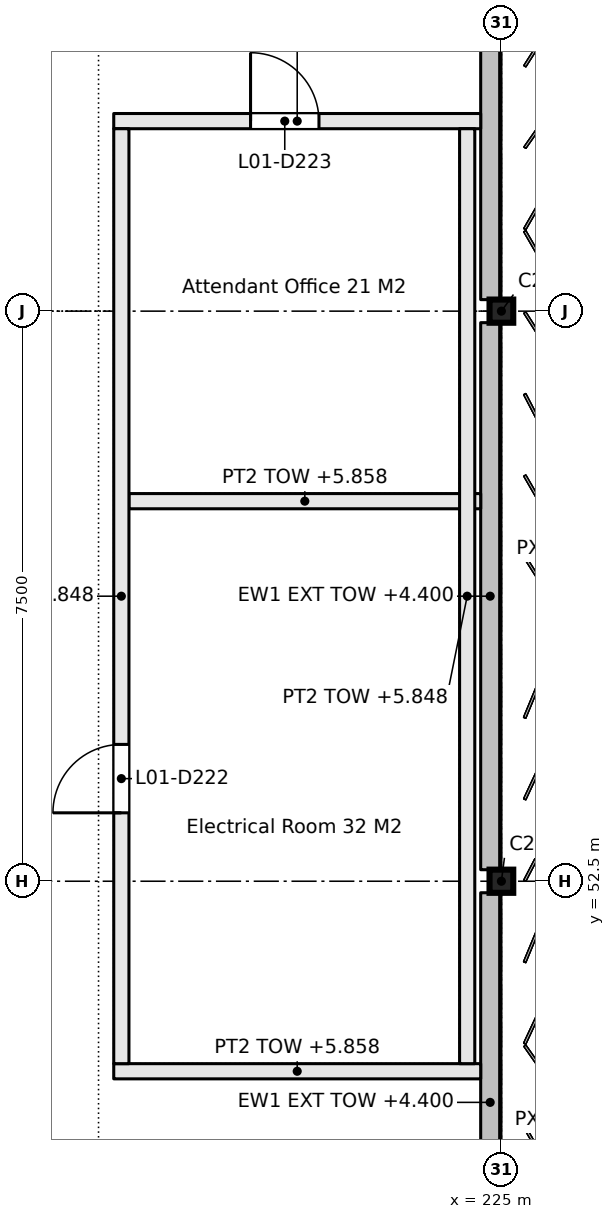
"""IFC4 building model, lengths in metres.
Left out: names, types, materials, properties, quantities, classifications, styles, units other than length and angle.
Written with IfcOpenShell. Run it as: python <this file> out.ifc"""

import sys

from ifc_helpers import new_model, si_unit, direction, frame, frame_2d, origin, origin_2d, place, context, subcontext, project, spatial, rectangle, i_section, extrude, element, fill, save


model = new_model("IFC4")
c1 = context("Model", 3, precision=1e-05, world=origin(), true_north=direction((0.0, 1.0)))
c2 = subcontext(c1, "Body", "Model", "MODEL_VIEW")
j1 = project(units=[si_unit("LENGTHUNIT", "METRE"), si_unit("PLANEANGLEUNIT", "RADIAN")], contexts=[c1])
p1 = place(None, origin())
s1 = spatial("IfcSite", under=j1, at=p1, CompositionType="ELEMENT")
p2 = place(p1, origin())
s2 = spatial("IfcBuilding", under=s1, at=p2, CompositionType="ELEMENT")
p3 = place(p2, frame((0.0, 0.0, 3.3)))
s3 = spatial("IfcBuildingStorey", under=s2, at=p3, CompositionType="ELEMENT", Elevation=3.3)
for number, where, z_axis, x_axis in (
    (1, (225.0, 60.0, 0.0), (0.0, 0.0, 1.0), (0.0, 1.0, 0.0)),
    (2, (225.0, 52.5, 0.0), (0.0, 0.0, 1.0), (0.0, 1.0, 0.0)),
):
    element("IfcColumn", number, at=place(p3, frame(where, z_axis=z_axis, x_axis=x_axis)), inside=s3, PredefinedType="COLUMN", context=c2, shape_type="SweptSolid", body=[
        extrude(i_section(OverallWidth=0.305, OverallDepth=0.312, WebThickness=0.011, FlangeThickness=0.017, FilletRadius=0.015, at=origin_2d()), origin(), (0.0, 0.0, 1.0), 3.3),
    ])
p4 = place(p3, frame((219.9, 50.0, 0.0), z_axis=(0.0, 0.0, 1.0), x_axis=(1.0, 0.0, 0.0)))
e3 = element("IfcWall", 3, at=p4, inside=s3, PredefinedType="PARTITIONING", context=c2, shape_type="SweptSolid", body=[
    extrude(rectangle(XDim=4.828, YDim=0.2, at=frame_2d((2.414, 0.0))), origin(), (0.0, 0.0, 1.0), 2.558),
])
p5 = place(p3, frame((220.1, 57.5, 0.0), z_axis=(0.0, 0.0, 1.0), x_axis=(1.0, 0.0, 0.0)))
e4 = element("IfcWall", 4, at=p5, inside=s3, PredefinedType="PARTITIONING", context=c2, shape_type="SweptSolid", body=[
    extrude(rectangle(XDim=4.627, YDim=0.2, at=frame_2d((2.314, 0.0))), origin(), (0.0, 0.0, 1.0), 2.558),
])
p6 = place(p3, frame((219.9, 62.5, 0.0), z_axis=(0.0, 0.0, 1.0), x_axis=(1.0, 0.0, 0.0)))
e5 = element("IfcWall", 5, at=p6, inside=s3, PredefinedType="PARTITIONING", context=c2, shape_type="SweptSolid", body=[
    extrude(rectangle(XDim=4.828, YDim=0.2, at=frame_2d((2.414, 0.0))), origin(), (0.0, 0.0, 1.0), 2.558),
])
p7 = place(p6, frame((1.8, 0.0, 0.0)))
e6 = element("IfcOpeningElement", 6, at=p7, cuts=e5, PredefinedType="OPENING", context=c2, shape_type="SweptSolid", body=[
    extrude(rectangle(XDim=0.9, YDim=2.1, at=frame_2d((0.45, 1.05))), frame((0.0, 0.11, 0.0), z_axis=(0.0, -1.0, 0.0), x_axis=(1.0, 0.0, 0.0)), (0.0, 0.0, 1.0), 0.22),
])
p8 = place(p3, frame((220.0, 50.1, 0.0), z_axis=(0.0, 0.0, 1.0), x_axis=(0.0, 1.0, 0.0)))
e7 = element("IfcWall", 7, at=p8, inside=s3, PredefinedType="PARTITIONING", context=c2, shape_type="SweptSolid", body=[
    extrude(rectangle(XDim=12.3, YDim=0.2, at=frame_2d((6.15, 0.0))), origin(), (0.0, 0.0, 1.0), 2.548),
])
p9 = place(p8, frame((3.3, 0.0, 0.0)))
e8 = element("IfcOpeningElement", 8, at=p9, cuts=e7, PredefinedType="OPENING", context=c2, shape_type="SweptSolid", body=[
    extrude(rectangle(XDim=0.9, YDim=2.1, at=frame_2d((0.45, 1.05))), frame((0.0, 0.11, 0.0), z_axis=(0.0, -1.0, 0.0), x_axis=(1.0, 0.0, 0.0)), (0.0, 0.0, 1.0), 0.22),
])
p10 = place(p3, frame((224.55, 50.1, 0.0), z_axis=(0.0, 0.0, 1.0), x_axis=(0.0, 1.0, 0.0)))
e9 = element("IfcWall", 9, at=p10, inside=s3, PredefinedType="PARTITIONING", context=c2, shape_type="SweptSolid", body=[
    extrude(rectangle(XDim=12.3, YDim=0.2, at=frame_2d((6.15, 0.0))), origin(), (0.0, 0.0, 1.0), 2.548),
])
for number, where, z_axis, x_axis in (
    (10, (224.853, 45.152, 0.0), (0.0, 0.0, 1.0), (0.0, 1.0, 0.0)),
    (11, (224.853, 52.652, 0.0), (0.0, 0.0, 1.0), (0.0, 1.0, 0.0)),
    (12, (224.853, 60.152, 0.0), (0.0, 0.0, 1.0), (0.0, 1.0, 0.0)),
):
    element("IfcWall", number, at=place(p3, frame(where, z_axis=z_axis, x_axis=x_axis)), inside=s3, PredefinedType="SOLIDWALL", context=c2, shape_type="SweptSolid", body=[
        extrude(rectangle(XDim=7.197, YDim=0.25, at=frame_2d((3.598, 0.0))), origin(), (0.0, 0.0, 1.0), 1.1),
    ])
p11 = place(p9, origin())
e13 = element("IfcDoor", 13, at=p11, inside=s3, OperationType="SINGLE_SWING_LEFT", PredefinedType="DOOR", context=c2, shape_type="SweptSolid", body=[
    extrude(rectangle(XDim=0.9, YDim=2.1, at=frame_2d((0.45, 1.05))), frame((0.0, 0.025, 0.0), z_axis=(0.0, -1.0, 0.0), x_axis=(1.0, 0.0, 0.0)), (0.0, 0.0, 1.0), 0.05),
])
fill(e8, e13)
p12 = place(p7, origin())
e14 = element("IfcDoor", 14, at=p12, inside=s3, OperationType="SINGLE_SWING_LEFT", PredefinedType="DOOR", context=c2, shape_type="SweptSolid", body=[
    extrude(rectangle(XDim=0.9, YDim=2.1, at=frame_2d((0.45, 1.05))), frame((0.0, 0.025, 0.0), z_axis=(0.0, -1.0, 0.0), x_axis=(1.0, 0.0, 0.0)), (0.0, 0.0, 1.0), 0.05),
])
fill(e6, e14)
save(model, sys.argv[1])
